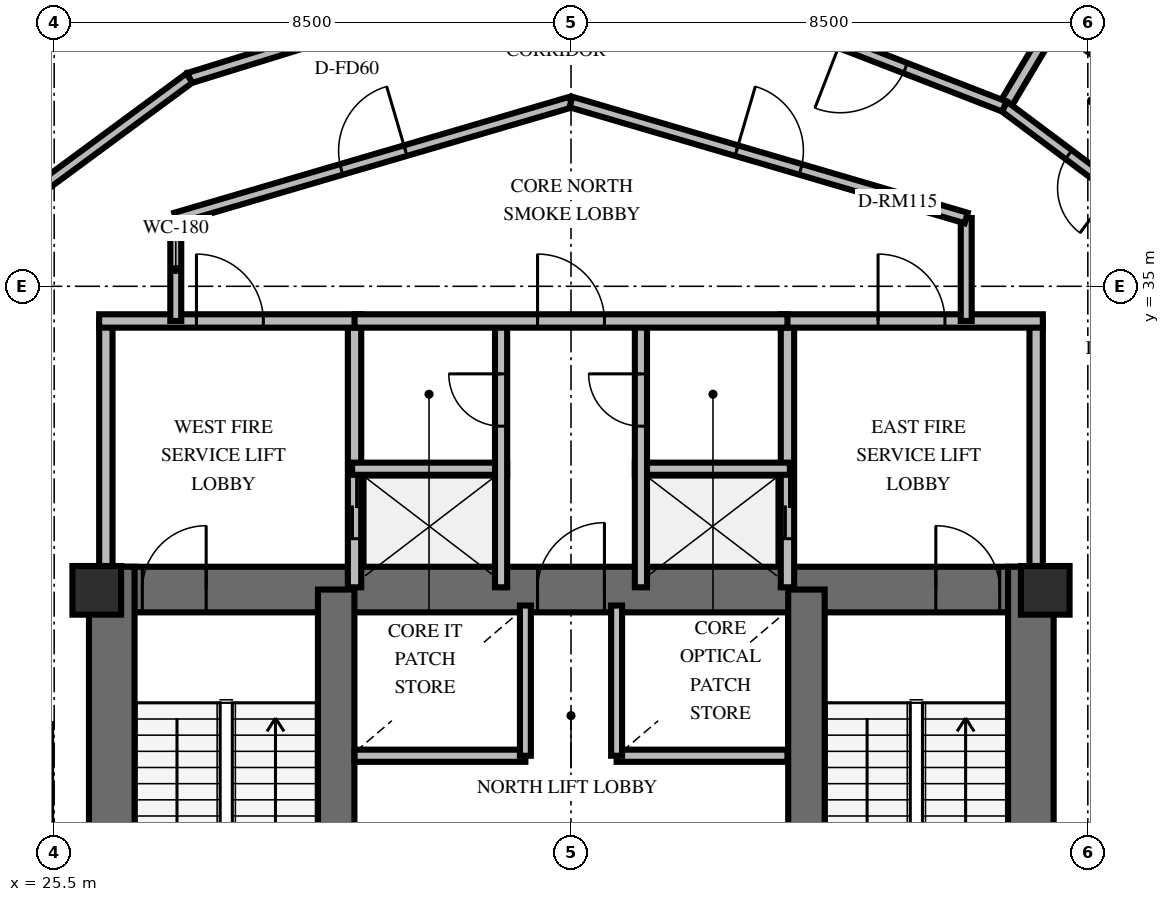
"""IFC4 building model, lengths in metres.
Left out: names, types, materials, properties, quantities, classifications, styles, units other than length and angle.
Written with IfcOpenShell. Run it as: python <this file> out.ifc"""

import sys

from ifc_helpers import new_model, si_unit, direction, frame, frame_2d, origin, origin_2d, place, context, subcontext, project, spatial, rectangle, extrude, element, fill, save


model = new_model("IFC4")
c1 = context("Model", 3, precision=1e-05, world=origin(), true_north=direction((0.0, 1.0)))
c2 = subcontext(c1, "Body", "Model", "MODEL_VIEW")
j1 = project(units=[si_unit("LENGTHUNIT", "METRE"), si_unit("PLANEANGLEUNIT", "RADIAN")], contexts=[c1])
p1 = place(None, origin())
s1 = spatial("IfcSite", under=j1, at=p1, CompositionType="ELEMENT")
p2 = place(p1, origin())
s2 = spatial("IfcBuilding", under=s1, at=p2, CompositionType="ELEMENT")
p3 = place(p2, frame((0.0, 0.0, 97.8)))
s3 = spatial("IfcBuildingStorey", under=s2, at=p3, CompositionType="ELEMENT", Elevation=97.8)
p4 = place(p3, frame((26.072, 30.013, 0.0), z_axis=(0.0, 0.0, 1.0), x_axis=(1.0, 0.0, 0.0)))
e1 = element("IfcWall", 1, at=p4, inside=s3, PredefinedType="SHEAR", context=c2, shape_type="SweptSolid", body=[
    extrude(rectangle(XDim=15.866, YDim=0.75, at=frame_2d((7.933, 0.0))), origin(), (0.0, 0.0, 1.0), 4.0),
])
p5 = place(p4, frame((0.878, 0.0, 0.0)))
e2 = element("IfcOpeningElement", 2, at=p5, cuts=e1, PredefinedType="OPENING", context=c2, shape_type="SweptSolid", body=[
    extrude(rectangle(XDim=1.05, YDim=2.15, at=frame_2d((0.525, 1.075))), frame((0.0, 0.385, 0.0), z_axis=(0.0, -1.0, 0.0), x_axis=(1.0, 0.0, 0.0)), (0.0, 0.0, 1.0), 0.77),
])
p6 = place(p4, frame((13.928, 0.0, 0.0)))
e3 = element("IfcOpeningElement", 3, at=p6, cuts=e1, PredefinedType="OPENING", context=c2, shape_type="SweptSolid", body=[
    extrude(rectangle(XDim=1.05, YDim=2.15, at=frame_2d((0.525, 1.075))), frame((0.0, 0.385, 0.0), z_axis=(0.0, -1.0, 0.0), x_axis=(1.0, 0.0, 0.0)), (0.0, 0.0, 1.0), 0.77),
])
p7 = place(p4, frame((7.378, 0.0, 0.0)))
e4 = element("IfcOpeningElement", 4, at=p7, cuts=e1, PredefinedType="OPENING", context=c2, shape_type="SweptSolid", body=[
    extrude(rectangle(XDim=1.1, YDim=2.15, at=frame_2d((0.55, 1.075))), frame((0.0, 0.385, 0.0), z_axis=(0.0, -1.0, 0.0), x_axis=(1.0, 0.0, 0.0)), (0.0, 0.0, 1.0), 0.77),
])
for number, where, z_axis, x_axis in (
    (5, (26.447, 19.812, 0.0), (0.0, 0.0, 1.0), (0.0, 1.0, 0.0)),
    (6, (41.563, 19.812, 0.0), (0.0, 0.0, 1.0), (0.0, 1.0, 0.0)),
):
    element("IfcWall", number, at=place(p3, frame(where, z_axis=z_axis, x_axis=x_axis)), inside=s3, PredefinedType="SHEAR", context=c2, shape_type="SweptSolid", body=[
        extrude(rectangle(XDim=10.576, YDim=0.75, at=frame_2d((5.288, 0.0))), origin(), (0.0, 0.0, 1.0), 4.0),
    ])
for number, where, z_axis, x_axis in (
    (7, (30.138, 20.187, 0.0), (0.0, 0.0, 1.0), (0.0, 1.0, 0.0)),
    (8, (37.872, 20.187, 0.0), (0.0, 0.0, 1.0), (0.0, 1.0, 0.0)),
):
    element("IfcWall", number, at=place(p3, frame(where, z_axis=z_axis, x_axis=x_axis)), inside=s3, PredefinedType="SHEAR", context=c2, shape_type="SweptSolid", body=[
        extrude(rectangle(XDim=9.826, YDim=0.6, at=frame_2d((4.913, 0.0))), origin(), (0.0, 0.0, 1.0), 4.0),
    ])
for number, where, z_axis, x_axis in (
    (9, (26.2, 30.0, 0.0), (0.0, 0.0, 1.0), (1.0, 0.0, 0.0)),
    (10, (41.8, 30.0, 0.0), (0.0, 0.0, 1.0), (1.0, 0.0, 0.0)),
):
    element("IfcColumn", number, at=place(p3, frame(where, z_axis=z_axis, x_axis=x_axis)), inside=s3, PredefinedType="PILASTER", context=c2, shape_type="SweptSolid", body=[
        extrude(rectangle(XDim=0.8, YDim=0.8, at=origin_2d()), origin(), (0.0, 0.0, 1.0), 4.0),
    ])
p8 = place(p3, frame((26.35, 30.05, 0.0), z_axis=(0.0, 0.0, 1.0), x_axis=(0.0, 1.0, 0.0)))
e11 = element("IfcWall", 11, at=p8, inside=s3, PredefinedType="SOLIDWALL", context=c2, shape_type="SweptSolid", body=[
    extrude(rectangle(XDim=4.38, YDim=0.22, at=frame_2d((2.19, 0.0))), origin(), (0.0, 0.0, 1.0), 2.8),
])
p9 = place(p3, frame((30.44, 30.05, 0.0), z_axis=(0.0, 0.0, 1.0), x_axis=(0.0, 1.0, 0.0)))
e12 = element("IfcWall", 12, at=p9, inside=s3, PredefinedType="SOLIDWALL", context=c2, shape_type="SweptSolid", body=[
    extrude(rectangle(XDim=4.38, YDim=0.22, at=frame_2d((2.19, 0.0))), origin(), (0.0, 0.0, 1.0), 2.8),
])
p10 = place(p9, frame((0.8, 0.0, 0.0)))
e13 = element("IfcOpeningElement", 13, at=p10, cuts=e12, PredefinedType="OPENING", context=c2, shape_type="SweptSolid", body=[
    extrude(rectangle(XDim=1.05, YDim=2.1, at=frame_2d((0.525, 1.05))), frame((0.0, 0.12, 0.0), z_axis=(0.0, -1.0, 0.0), x_axis=(1.0, 0.0, 0.0)), (0.0, 0.0, 1.0), 0.24),
])
p11 = place(p3, frame((26.24, 34.43, 0.0), z_axis=(0.0, 0.0, 1.0), x_axis=(1.0, 0.0, 0.0)))
e14 = element("IfcWall", 14, at=p11, inside=s3, PredefinedType="SOLIDWALL", context=c2, shape_type="SweptSolid", body=[
    extrude(rectangle(XDim=4.31, YDim=0.22, at=frame_2d((2.155, 0.0))), origin(), (0.0, 0.0, 1.0), 2.8),
])
p12 = place(p11, frame((1.6, 0.0, 0.0)))
e15 = element("IfcOpeningElement", 15, at=p12, cuts=e14, PredefinedType="OPENING", context=c2, shape_type="SweptSolid", body=[
    extrude(rectangle(XDim=1.1, YDim=2.15, at=frame_2d((0.55, 1.075))), frame((0.0, 0.12, 0.0), z_axis=(0.0, -1.0, 0.0), x_axis=(1.0, 0.0, 0.0)), (0.0, 0.0, 1.0), 0.24),
])
p13 = place(p3, frame((30.4, 32.0, 0.0), z_axis=(0.0, 0.0, 1.0), x_axis=(1.0, 0.0, 0.0)))
e16 = element("IfcWall", 16, at=p13, inside=s3, PredefinedType="SOLIDWALL", context=c2, shape_type="SweptSolid", body=[
    extrude(rectangle(XDim=2.55, YDim=0.2, at=frame_2d((1.275, 0.0))), origin(), (0.0, 0.0, 1.0), 2.8),
])
p14 = place(p3, frame((32.85, 30.05, 0.0), z_axis=(0.0, 0.0, 1.0), x_axis=(0.0, 1.0, 0.0)))
e17 = element("IfcWall", 17, at=p14, inside=s3, PredefinedType="SOLIDWALL", context=c2, shape_type="SweptSolid", body=[
    extrude(rectangle(XDim=4.38, YDim=0.2, at=frame_2d((2.19, 0.0))), origin(), (0.0, 0.0, 1.0), 2.8),
])
p15 = place(p14, frame((2.65, 0.0, 0.0)))
e18 = element("IfcOpeningElement", 18, at=p15, cuts=e17, PredefinedType="OPENING", context=c2, shape_type="SweptSolid", body=[
    extrude(rectangle(XDim=0.86, YDim=2.05, at=frame_2d((0.43, 1.025))), frame((0.0, 0.11, 0.0), z_axis=(0.0, -1.0, 0.0), x_axis=(1.0, 0.0, 0.0)), (0.0, 0.0, 1.0), 0.22),
])
p16 = place(p3, frame((37.56, 30.05, 0.0), z_axis=(0.0, 0.0, 1.0), x_axis=(0.0, 1.0, 0.0)))
e19 = element("IfcWall", 19, at=p16, inside=s3, PredefinedType="SOLIDWALL", context=c2, shape_type="SweptSolid", body=[
    extrude(rectangle(XDim=4.38, YDim=0.22, at=frame_2d((2.19, 0.0))), origin(), (0.0, 0.0, 1.0), 2.8),
])
p17 = place(p16, frame((0.8, 0.0, 0.0)))
e20 = element("IfcOpeningElement", 20, at=p17, cuts=e19, PredefinedType="OPENING", context=c2, shape_type="SweptSolid", body=[
    extrude(rectangle(XDim=1.05, YDim=2.1, at=frame_2d((0.525, 1.05))), frame((0.0, 0.12, 0.0), z_axis=(0.0, -1.0, 0.0), x_axis=(1.0, 0.0, 0.0)), (0.0, 0.0, 1.0), 0.24),
])
p18 = place(p3, frame((41.65, 30.05, 0.0), z_axis=(0.0, 0.0, 1.0), x_axis=(0.0, 1.0, 0.0)))
e21 = element("IfcWall", 21, at=p18, inside=s3, PredefinedType="SOLIDWALL", context=c2, shape_type="SweptSolid", body=[
    extrude(rectangle(XDim=4.38, YDim=0.22, at=frame_2d((2.19, 0.0))), origin(), (0.0, 0.0, 1.0), 2.8),
])
p19 = place(p3, frame((37.45, 34.43, 0.0), z_axis=(0.0, 0.0, 1.0), x_axis=(1.0, 0.0, 0.0)))
e22 = element("IfcWall", 22, at=p19, inside=s3, PredefinedType="SOLIDWALL", context=c2, shape_type="SweptSolid", body=[
    extrude(rectangle(XDim=4.31, YDim=0.22, at=frame_2d((2.155, 0.0))), origin(), (0.0, 0.0, 1.0), 2.8),
])
p20 = place(p19, frame((1.6, 0.0, 0.0)))
e23 = element("IfcOpeningElement", 23, at=p20, cuts=e22, PredefinedType="OPENING", context=c2, shape_type="SweptSolid", body=[
    extrude(rectangle(XDim=1.1, YDim=2.15, at=frame_2d((0.55, 1.075))), frame((0.0, 0.12, 0.0), z_axis=(0.0, -1.0, 0.0), x_axis=(1.0, 0.0, 0.0)), (0.0, 0.0, 1.0), 0.24),
])
p21 = place(p3, frame((35.05, 32.0, 0.0), z_axis=(0.0, 0.0, 1.0), x_axis=(1.0, 0.0, 0.0)))
e24 = element("IfcWall", 24, at=p21, inside=s3, PredefinedType="SOLIDWALL", context=c2, shape_type="SweptSolid", body=[
    extrude(rectangle(XDim=2.55, YDim=0.2, at=frame_2d((1.275, 0.0))), origin(), (0.0, 0.0, 1.0), 2.8),
])
p22 = place(p3, frame((35.15, 30.05, 0.0), z_axis=(0.0, 0.0, 1.0), x_axis=(0.0, 1.0, 0.0)))
e25 = element("IfcWall", 25, at=p22, inside=s3, PredefinedType="SOLIDWALL", context=c2, shape_type="SweptSolid", body=[
    extrude(rectangle(XDim=4.38, YDim=0.2, at=frame_2d((2.19, 0.0))), origin(), (0.0, 0.0, 1.0), 2.8),
])
p23 = place(p22, frame((2.65, 0.0, 0.0)))
e26 = element("IfcOpeningElement", 26, at=p23, cuts=e25, PredefinedType="OPENING", context=c2, shape_type="SweptSolid", body=[
    extrude(rectangle(XDim=0.86, YDim=2.05, at=frame_2d((0.43, 1.025))), frame((0.0, 0.11, 0.0), z_axis=(0.0, -1.0, 0.0), x_axis=(1.0, 0.0, 0.0)), (0.0, 0.0, 1.0), 0.22),
])
p24 = place(p3, frame((30.44, 34.43, 0.0), z_axis=(0.0, 0.0, 1.0), x_axis=(1.0, 0.0, 0.0)))
e27 = element("IfcWall", 27, at=p24, inside=s3, PredefinedType="SOLIDWALL", context=c2, shape_type="SweptSolid", body=[
    extrude(rectangle(XDim=7.12, YDim=0.22, at=frame_2d((3.56, 0.0))), origin(), (0.0, 0.0, 1.0), 2.8),
])
p25 = place(p24, frame((3.01, 0.0, 0.0)))
e28 = element("IfcOpeningElement", 28, at=p25, cuts=e27, PredefinedType="OPENING", context=c2, shape_type="SweptSolid", body=[
    extrude(rectangle(XDim=1.1, YDim=2.15, at=frame_2d((0.55, 1.075))), frame((0.0, 0.12, 0.0), z_axis=(0.0, -1.0, 0.0), x_axis=(1.0, 0.0, 0.0)), (0.0, 0.0, 1.0), 0.24),
])
p26 = place(p3, frame((30.44, 27.28, 0.0), z_axis=(0.0, 0.0, 1.0), x_axis=(1.0, 0.0, 0.0)))
e29 = element("IfcWall", 29, at=p26, inside=s3, PredefinedType="SOLIDWALL", context=c2, shape_type="SweptSolid", body=[
    extrude(rectangle(XDim=2.81, YDim=0.2, at=frame_2d((1.405, 0.0))), origin(), (0.0, 0.0, 1.0), 2.8),
])
p27 = place(p3, frame((33.25, 27.28, 0.0), z_axis=(0.0, 0.0, 1.0), x_axis=(0.0, 1.0, 0.0)))
e30 = element("IfcWall", 30, at=p27, inside=s3, PredefinedType="SOLIDWALL", context=c2, shape_type="SweptSolid", body=[
    extrude(rectangle(XDim=2.47, YDim=0.18, at=frame_2d((1.235, 0.0))), origin(), (0.0, 0.0, 1.0), 2.8),
])
p28 = place(p3, frame((34.75, 27.28, 0.0), z_axis=(0.0, 0.0, 1.0), x_axis=(1.0, 0.0, 0.0)))
e31 = element("IfcWall", 31, at=p28, inside=s3, PredefinedType="SOLIDWALL", context=c2, shape_type="SweptSolid", body=[
    extrude(rectangle(XDim=2.81, YDim=0.2, at=frame_2d((1.405, 0.0))), origin(), (0.0, 0.0, 1.0), 2.8),
])
p29 = place(p3, frame((34.75, 27.28, 0.0), z_axis=(0.0, 0.0, 1.0), x_axis=(0.0, 1.0, 0.0)))
e32 = element("IfcWall", 32, at=p29, inside=s3, PredefinedType="SOLIDWALL", context=c2, shape_type="SweptSolid", body=[
    extrude(rectangle(XDim=2.47, YDim=0.18, at=frame_2d((1.235, 0.0))), origin(), (0.0, 0.0, 1.0), 2.8),
])
for number, where, z_axis, x_axis in (
    (33, (27.5, 34.43, 0.0), (0.0, 0.0, 1.0), (0.0, 1.0, 0.0)),
    (34, (40.5, 36.123, 0.0), (0.0, 0.0, 1.0), (0.0, -1.0, 0.0)),
):
    element("IfcWall", number, at=place(p3, frame(where, z_axis=z_axis, x_axis=x_axis)), inside=s3, PredefinedType="PARTITIONING", context=c2, shape_type="SweptSolid", body=[
        extrude(rectangle(XDim=1.693, YDim=0.18, at=frame_2d((0.846, 0.0))), origin(), (0.0, 0.0, 1.0), 2.8),
    ])
p30 = place(p3, frame((27.5, 36.123, 0.0), z_axis=(0.0, 0.0, 1.0), x_axis=(0.959546654541, 0.281549671923, 0.0)))
e35 = element("IfcWall", 35, at=p30, inside=s3, PredefinedType="PARTITIONING", context=c2, shape_type="SweptSolid", body=[
    extrude(rectangle(XDim=6.774, YDim=0.18, at=frame_2d((3.387, 0.0))), origin(), (0.0, 0.0, 1.0), 2.8),
])
p31 = place(p30, frame((2.837, 0.0, 0.0)))
e36 = element("IfcOpeningElement", 36, at=p31, cuts=e35, PredefinedType="OPENING", context=c2, shape_type="SweptSolid", body=[
    extrude(rectangle(XDim=1.1, YDim=2.15, at=frame_2d((0.55, 1.075))), frame((0.0, 0.1, 0.0), z_axis=(0.0, -1.0, 0.0), x_axis=(1.0, 0.0, 0.0)), (0.0, 0.0, 1.0), 0.2),
])
p32 = place(p3, frame((34.0, 38.03, 0.0), z_axis=(0.0, 0.0, 1.0), x_axis=(0.959546654541, -0.281549671923, 0.0)))
e37 = element("IfcWall", 37, at=p32, inside=s3, PredefinedType="PARTITIONING", context=c2, shape_type="SweptSolid", body=[
    extrude(rectangle(XDim=6.774, YDim=0.18, at=frame_2d((3.387, 0.0))), origin(), (0.0, 0.0, 1.0), 2.8),
])
p33 = place(p32, frame((2.837, 0.0, 0.0)))
e38 = element("IfcOpeningElement", 38, at=p33, cuts=e37, PredefinedType="OPENING", context=c2, shape_type="SweptSolid", body=[
    extrude(rectangle(XDim=1.1, YDim=2.15, at=frame_2d((0.55, 1.075))), frame((0.0, 0.1, 0.0), z_axis=(0.0, -1.0, 0.0), x_axis=(1.0, 0.0, 0.0)), (0.0, 0.0, 1.0), 0.2),
])
p34 = place(p3, frame((41.128, 37.957, 0.0), z_axis=(0.0, 0.0, 1.0), x_axis=(0.511991057983, 0.858990777916, 0.0)))
e39 = element("IfcWall", 39, at=p34, inside=s3, PredefinedType="PLUMBINGWALL", context=c2, shape_type="SweptSolid", body=[
    extrude(rectangle(XDim=1.65, YDim=0.2, at=frame_2d((0.825, 0.0))), origin(), (0.0, 0.0, 1.0), 2.8),
])
p35 = place(p3, frame((44.579, 37.424, 0.0), z_axis=(0.0, 0.0, 1.0), x_axis=(-0.800755417195, 0.598991453889, 0.0)))
e40 = element("IfcWall", 40, at=p35, inside=s3, PredefinedType="PLUMBINGWALL", context=c2, shape_type="SweptSolid", body=[
    extrude(rectangle(XDim=3.255, YDim=0.2, at=frame_2d((1.627, 0.0))), origin(), (0.0, 0.0, 1.0), 2.8),
])
p36 = place(p3, frame((43.458, 36.213, 0.0), z_axis=(0.0, 0.0, 1.0), x_axis=(-0.800684054085, 0.599086843066, 0.0)))
e41 = element("IfcWall", 41, at=p36, inside=s3, PredefinedType="PARTITIONING", context=c2, shape_type="SweptSolid", body=[
    extrude(rectangle(XDim=2.91, YDim=0.18, at=frame_2d((1.455, 0.0))), origin(), (0.0, 0.0, 1.0), 2.8),
])
p37 = place(p36, frame((0.669, 0.0, 0.0)))
e42 = element("IfcOpeningElement", 42, at=p37, cuts=e41, PredefinedType="OPENING", context=c2, shape_type="SweptSolid", body=[
    extrude(rectangle(XDim=0.92, YDim=2.1, at=frame_2d((0.46, 1.05))), frame((0.0, 0.1, 0.0), z_axis=(0.0, -1.0, 0.0), x_axis=(1.0, 0.0, 0.0)), (0.0, 0.0, 1.0), 0.2),
])
p38 = place(p3, frame((41.128, 37.957, 0.0), z_axis=(0.0, 0.0, 1.0), x_axis=(-0.932324045504, 0.361623940267, 0.0)))
e43 = element("IfcWall", 43, at=p38, inside=s3, PredefinedType="PARTITIONING", context=c2, shape_type="SweptSolid", body=[
    extrude(rectangle(XDim=4.643, YDim=0.18, at=frame_2d((2.321, 0.0))), origin(), (0.0, 0.0, 1.0), 2.8),
])
p39 = place(p38, frame((1.746, 0.0, 0.0)))
e44 = element("IfcOpeningElement", 44, at=p39, cuts=e43, PredefinedType="OPENING", context=c2, shape_type="SweptSolid", body=[
    extrude(rectangle(XDim=1.15, YDim=2.15, at=frame_2d((0.575, 1.075))), frame((0.0, 0.1, 0.0), z_axis=(0.0, -1.0, 0.0), x_axis=(1.0, 0.0, 0.0)), (0.0, 0.0, 1.0), 0.2),
])
p40 = place(p3, frame((32.159, 39.798, 0.0), z_axis=(0.0, 0.0, 1.0), x_axis=(-0.955283061379, -0.295692868773, 0.0)))
e45 = element("IfcWall", 45, at=p40, inside=s3, PredefinedType="PARTITIONING", context=c2, shape_type="SweptSolid", body=[
    extrude(rectangle(XDim=4.643, YDim=0.18, at=frame_2d((2.321, 0.0))), origin(), (0.0, 0.0, 1.0), 2.8),
])
p41 = place(p3, frame((27.724, 38.425, 0.0), z_axis=(0.0, 0.0, 1.0), x_axis=(-0.804901173795, -0.593408881314, 0.0)))
e46 = element("IfcWall", 46, at=p41, inside=s3, PredefinedType="PARTITIONING", context=c2, shape_type="SweptSolid", body=[
    extrude(rectangle(XDim=4.643, YDim=0.18, at=frame_2d((2.321, 0.0))), origin(), (0.0, 0.0, 1.0), 2.8),
])
p42 = place(p5, origin())
e47 = element("IfcDoor", 47, at=p42, inside=s3, OperationType="SINGLE_SWING_RIGHT", PredefinedType="DOOR", context=c2, shape_type="SweptSolid", body=[
    extrude(rectangle(XDim=1.05, YDim=2.15, at=frame_2d((0.525, 1.075))), frame((0.0, 0.025, 0.0), z_axis=(0.0, -1.0, 0.0), x_axis=(1.0, 0.0, 0.0)), (0.0, 0.0, 1.0), 0.05),
])
fill(e2, e47)
p43 = place(p6, origin())
e48 = element("IfcDoor", 48, at=p43, inside=s3, OperationType="SINGLE_SWING_LEFT", PredefinedType="DOOR", context=c2, shape_type="SweptSolid", body=[
    extrude(rectangle(XDim=1.05, YDim=2.15, at=frame_2d((0.525, 1.075))), frame((0.0, 0.025, 0.0), z_axis=(0.0, -1.0, 0.0), x_axis=(1.0, 0.0, 0.0)), (0.0, 0.0, 1.0), 0.05),
])
fill(e3, e48)
p44 = place(p7, origin())
e49 = element("IfcDoor", 49, at=p44, inside=s3, OperationType="SINGLE_SWING_RIGHT", PredefinedType="DOOR", context=c2, shape_type="SweptSolid", body=[
    extrude(rectangle(XDim=1.1, YDim=2.15, at=frame_2d((0.55, 1.075))), frame((0.0, 0.025, 0.0), z_axis=(0.0, -1.0, 0.0), x_axis=(1.0, 0.0, 0.0)), (0.0, 0.0, 1.0), 0.05),
])
fill(e4, e49)
p45 = place(p12, origin())
e50 = element("IfcDoor", 50, at=p45, inside=s3, OperationType="SINGLE_SWING_LEFT", PredefinedType="DOOR", context=c2, shape_type="SweptSolid", body=[
    extrude(rectangle(XDim=1.1, YDim=2.15, at=frame_2d((0.55, 1.075))), frame((0.0, 0.025, 0.0), z_axis=(0.0, -1.0, 0.0), x_axis=(1.0, 0.0, 0.0)), (0.0, 0.0, 1.0), 0.05),
])
fill(e15, e50)
p46 = place(p10, origin())
e51 = element("IfcDoor", 51, at=p46, inside=s3, OperationType="DOUBLE_DOOR_SLIDING", PredefinedType="USERDEFINED", context=c2, shape_type="SweptSolid", body=[
    extrude(rectangle(XDim=1.05, YDim=2.1, at=frame_2d((0.525, 1.05))), frame((0.0, 0.025, 0.0), z_axis=(0.0, -1.0, 0.0), x_axis=(1.0, 0.0, 0.0)), (0.0, 0.0, 1.0), 0.05),
])
fill(e13, e51)
p47 = place(p15, origin())
e52 = element("IfcDoor", 52, at=p47, inside=s3, OperationType="SINGLE_SWING_RIGHT", PredefinedType="TRAPDOOR", context=c2, shape_type="SweptSolid", body=[
    extrude(rectangle(XDim=0.86, YDim=2.05, at=frame_2d((0.43, 1.025))), frame((0.0, 0.025, 0.0), z_axis=(0.0, -1.0, 0.0), x_axis=(1.0, 0.0, 0.0)), (0.0, 0.0, 1.0), 0.05),
])
fill(e18, e52)
p48 = place(p20, origin())
e53 = element("IfcDoor", 53, at=p48, inside=s3, OperationType="SINGLE_SWING_LEFT", PredefinedType="DOOR", context=c2, shape_type="SweptSolid", body=[
    extrude(rectangle(XDim=1.1, YDim=2.15, at=frame_2d((0.55, 1.075))), frame((0.0, 0.025, 0.0), z_axis=(0.0, -1.0, 0.0), x_axis=(1.0, 0.0, 0.0)), (0.0, 0.0, 1.0), 0.05),
])
fill(e23, e53)
p49 = place(p17, origin())
e54 = element("IfcDoor", 54, at=p49, inside=s3, OperationType="DOUBLE_DOOR_SLIDING", PredefinedType="USERDEFINED", context=c2, shape_type="SweptSolid", body=[
    extrude(rectangle(XDim=1.05, YDim=2.1, at=frame_2d((0.525, 1.05))), frame((0.0, 0.025, 0.0), z_axis=(0.0, -1.0, 0.0), x_axis=(1.0, 0.0, 0.0)), (0.0, 0.0, 1.0), 0.05),
])
fill(e20, e54)
p50 = place(p23, origin())
e55 = element("IfcDoor", 55, at=p50, inside=s3, OperationType="SINGLE_SWING_RIGHT", PredefinedType="TRAPDOOR", context=c2, shape_type="SweptSolid", body=[
    extrude(rectangle(XDim=0.86, YDim=2.05, at=frame_2d((0.43, 1.025))), frame((0.0, 0.025, 0.0), z_axis=(0.0, -1.0, 0.0), x_axis=(1.0, 0.0, 0.0)), (0.0, 0.0, 1.0), 0.05),
])
fill(e26, e55)
p51 = place(p25, origin())
e56 = element("IfcDoor", 56, at=p51, inside=s3, OperationType="SINGLE_SWING_LEFT", PredefinedType="DOOR", context=c2, shape_type="SweptSolid", body=[
    extrude(rectangle(XDim=1.1, YDim=2.15, at=frame_2d((0.55, 1.075))), frame((0.0, 0.025, 0.0), z_axis=(0.0, -1.0, 0.0), x_axis=(1.0, 0.0, 0.0)), (0.0, 0.0, 1.0), 0.05),
])
fill(e28, e56)
p52 = place(p31, origin())
e57 = element("IfcDoor", 57, at=p52, inside=s3, OperationType="SINGLE_SWING_RIGHT", PredefinedType="DOOR", context=c2, shape_type="SweptSolid", body=[
    extrude(rectangle(XDim=1.1, YDim=2.15, at=frame_2d((0.55, 1.075))), frame((0.0, 0.025, 0.0), z_axis=(0.0, -1.0, 0.0), x_axis=(1.0, 0.0, 0.0)), (0.0, 0.0, 1.0), 0.05),
])
fill(e36, e57)
p53 = place(p33, origin())
e58 = element("IfcDoor", 58, at=p53, inside=s3, OperationType="SINGLE_SWING_LEFT", PredefinedType="DOOR", context=c2, shape_type="SweptSolid", body=[
    extrude(rectangle(XDim=1.1, YDim=2.15, at=frame_2d((0.55, 1.075))), frame((0.0, 0.025, 0.0), z_axis=(0.0, -1.0, 0.0), x_axis=(1.0, 0.0, 0.0)), (0.0, 0.0, 1.0), 0.05),
])
fill(e38, e58)
p54 = place(p37, origin())
e59 = element("IfcDoor", 59, at=p54, inside=s3, OperationType="SINGLE_SWING_LEFT", PredefinedType="DOOR", context=c2, shape_type="SweptSolid", body=[
    extrude(rectangle(XDim=0.92, YDim=2.1, at=frame_2d((0.46, 1.05))), frame((0.0, 0.025, 0.0), z_axis=(0.0, -1.0, 0.0), x_axis=(1.0, 0.0, 0.0)), (0.0, 0.0, 1.0), 0.05),
])
fill(e42, e59)
p55 = place(p39, origin())
e60 = element("IfcDoor", 60, at=p55, inside=s3, OperationType="SINGLE_SWING_RIGHT", PredefinedType="DOOR", context=c2, shape_type="SweptSolid", body=[
    extrude(rectangle(XDim=1.15, YDim=2.15, at=frame_2d((0.575, 1.075))), frame((0.0, 0.025, 0.0), z_axis=(0.0, -1.0, 0.0), x_axis=(1.0, 0.0, 0.0)), (0.0, 0.0, 1.0), 0.05),
])
fill(e44, e60)
save(model, sys.argv[1])
